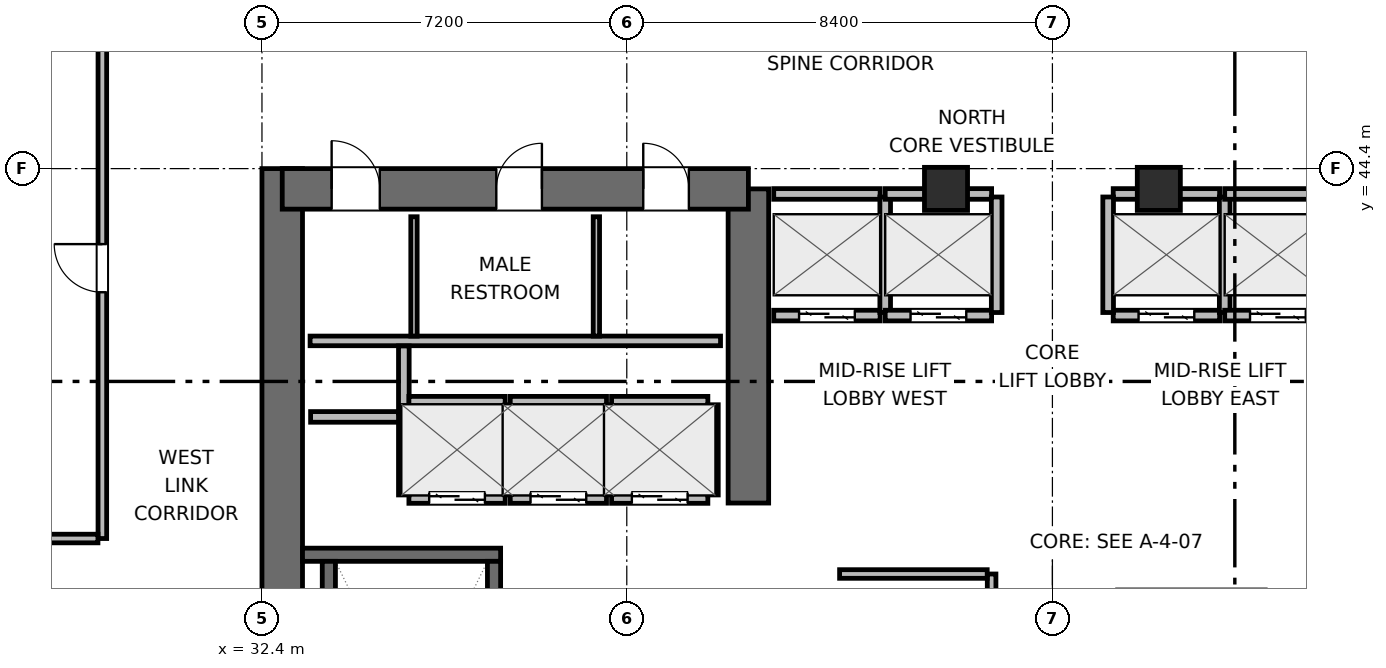
"""IFC4 building model, lengths in metres.
Left out: names, types, materials, properties, quantities, classifications, styles, units other than length and angle.
Written with IfcOpenShell. Run it as: python <this file> out.ifc"""

import sys

from ifc_helpers import new_model, si_unit, direction, frame, frame_2d, origin, origin_2d, place, context, subcontext, project, spatial, rectangle, extrude, element, fill, save


model = new_model("IFC4")
c1 = context("Model", 3, precision=1e-05, world=origin(), true_north=direction((0.0, 1.0)))
c2 = subcontext(c1, "Body", "Model", "MODEL_VIEW")
j1 = project(units=[si_unit("LENGTHUNIT", "METRE"), si_unit("PLANEANGLEUNIT", "RADIAN")], contexts=[c1])
p1 = place(None, origin())
s1 = spatial("IfcSite", under=j1, at=p1, CompositionType="ELEMENT")
p2 = place(p1, origin())
s2 = spatial("IfcBuilding", under=s1, at=p2, CompositionType="ELEMENT")
p3 = place(p2, frame((0.0, 0.0, 120.9)))
s3 = spatial("IfcBuildingStorey", under=s2, at=p3, CompositionType="ELEMENT", Elevation=120.9)
p4 = place(p3, frame((32.8, 27.6, 0.0), z_axis=(0.0, 0.0, 1.0), x_axis=(0.0, 1.0, 0.0)))
e1 = element("IfcWall", 1, at=p4, inside=s3, PredefinedType="SHEAR", context=c2, shape_type="SweptSolid", body=[
    extrude(rectangle(XDim=16.8, YDim=0.8, at=frame_2d((8.4, 0.0))), origin(), (0.0, 0.0, 1.0), 4.5),
])
p5 = place(p3, frame((42.0, 37.8, 0.0), z_axis=(0.0, 0.0, 1.0), x_axis=(0.0, 1.0, 0.0)))
e2 = element("IfcWall", 2, at=p5, inside=s3, PredefinedType="SHEAR", context=c2, shape_type="SweptSolid", body=[
    extrude(rectangle(XDim=6.2, YDim=0.8, at=frame_2d((3.1, 0.0))), origin(), (0.0, 0.0, 1.0), 4.5),
])
p6 = place(p3, frame((32.8, 44.0, 0.0), z_axis=(0.0, 0.0, 1.0), x_axis=(1.0, 0.0, 0.0)))
e3 = element("IfcWall", 3, at=p6, inside=s3, PredefinedType="SHEAR", context=c2, shape_type="SweptSolid", body=[
    extrude(rectangle(XDim=9.2, YDim=0.8, at=frame_2d((4.6, 0.0))), origin(), (0.0, 0.0, 1.0), 4.5),
])
p7 = place(p6, frame((0.975, 0.0, 0.0)))
e4 = element("IfcOpeningElement", 4, at=p7, cuts=e3, PredefinedType="OPENING", context=c2, shape_type="SweptSolid", body=[
    extrude(rectangle(XDim=0.95, YDim=2.04, at=frame_2d((0.475, 1.02))), frame((0.0, 0.41, 0.0), z_axis=(0.0, -1.0, 0.0), x_axis=(1.0, 0.0, 0.0)), (0.0, 0.0, 1.0), 0.82),
])
p8 = place(p6, frame((4.225, 0.0, 0.0)))
e5 = element("IfcOpeningElement", 5, at=p8, cuts=e3, PredefinedType="OPENING", context=c2, shape_type="SweptSolid", body=[
    extrude(rectangle(XDim=0.9, YDim=2.02, at=frame_2d((0.45, 1.01))), frame((0.0, 0.41, 0.0), z_axis=(0.0, -1.0, 0.0), x_axis=(1.0, 0.0, 0.0)), (0.0, 0.0, 1.0), 0.82),
])
p9 = place(p6, frame((7.125, 0.0, 0.0)))
e6 = element("IfcOpeningElement", 6, at=p9, cuts=e3, PredefinedType="OPENING", context=c2, shape_type="SweptSolid", body=[
    extrude(rectangle(XDim=0.9, YDim=2.02, at=frame_2d((0.45, 1.01))), frame((0.0, 0.41, 0.0), z_axis=(0.0, -1.0, 0.0), x_axis=(1.0, 0.0, 0.0)), (0.0, 0.0, 1.0), 0.82),
])
p10 = place(p3, frame((33.2, 36.78, 0.0), z_axis=(0.0, 0.0, 1.0), x_axis=(1.0, 0.0, 0.0)))
e7 = element("IfcWall", 7, at=p10, inside=s3, PredefinedType="SHEAR", context=c2, shape_type="SweptSolid", body=[
    extrude(rectangle(XDim=3.91, YDim=0.26, at=frame_2d((1.955, 0.0))), origin(), (0.0, 0.0, 1.0), 4.5),
])
p11 = place(p3, frame((33.72, 29.05, 0.0), z_axis=(0.0, 0.0, 1.0), x_axis=(0.0, 1.0, 0.0)))
e8 = element("IfcWall", 8, at=p11, inside=s3, PredefinedType="SHEAR", context=c2, shape_type="SweptSolid", body=[
    extrude(rectangle(XDim=7.6, YDim=0.26, at=frame_2d((3.8, 0.0))), origin(), (0.0, 0.0, 1.0), 4.5),
])
p12 = place(p3, frame((36.98, 29.05, 0.0), z_axis=(0.0, 0.0, 1.0), x_axis=(0.0, 1.0, 0.0)))
e9 = element("IfcWall", 9, at=p12, inside=s3, PredefinedType="SHEAR", context=c2, shape_type="SweptSolid", body=[
    extrude(rectangle(XDim=7.6, YDim=0.26, at=frame_2d((3.8, 0.0))), origin(), (0.0, 0.0, 1.0), 4.5),
])
p13 = place(p12, frame((0.3, 0.0, 0.0)))
e10 = element("IfcOpeningElement", 10, at=p13, cuts=e9, PredefinedType="OPENING", context=c2, shape_type="SweptSolid", body=[
    extrude(rectangle(XDim=1.0, YDim=2.04, at=frame_2d((0.5, 1.02))), frame((0.0, 0.14, 0.0), z_axis=(0.0, -1.0, 0.0), x_axis=(1.0, 0.0, 0.0)), (0.0, 0.0, 1.0), 0.28),
])
for number, where, z_axis, x_axis in (
    (11, (45.9, 44.0, 0.0), (0.0, 0.0, 1.0), (1.0, 0.0, 0.0)),
    (12, (50.1, 44.0, 0.0), (0.0, 0.0, 1.0), (1.0, 0.0, 0.0)),
):
    element("IfcColumn", number, at=place(p3, frame(where, z_axis=z_axis, x_axis=x_axis)), inside=s3, PredefinedType="COLUMN", context=c2, shape_type="SweptSolid", body=[
        extrude(rectangle(XDim=0.85, YDim=0.85, at=origin_2d()), origin(), (0.0, 0.0, 1.0), 4.5),
    ])
p14 = place(p3, frame((33.35, 41.0, 0.0), z_axis=(0.0, 0.0, 1.0), x_axis=(1.0, 0.0, 0.0)))
e13 = element("IfcWall", 13, at=p14, inside=s3, PredefinedType="PLUMBINGWALL", context=c2, shape_type="SweptSolid", body=[
    extrude(rectangle(XDim=8.1, YDim=0.19, at=frame_2d((4.05, 0.0))), origin(), (0.0, 0.0, 1.0), 4.24),
])
for number, where, z_axis, x_axis in (
    (14, (35.4, 41.095, 0.0), (0.0, 0.0, 1.0), (0.0, 1.0, 0.0)),
    (15, (39.0, 41.095, 0.0), (0.0, 0.0, 1.0), (0.0, 1.0, 0.0)),
):
    element("IfcWall", number, at=place(p3, frame(where, z_axis=z_axis, x_axis=x_axis)), inside=s3, PredefinedType="PARTITIONING", context=c2, shape_type="SweptSolid", body=[
        extrude(rectangle(XDim=2.355, YDim=0.125, at=frame_2d((1.177, 0.0))), origin(), (0.0, 0.0, 1.0), 4.24),
    ])
p15 = place(p3, frame((33.36, 39.5, 0.0), z_axis=(0.0, 0.0, 1.0), x_axis=(1.0, 0.0, 0.0)))
e16 = element("IfcWall", 16, at=p15, inside=s3, PredefinedType="PARTITIONING", context=c2, shape_type="SweptSolid", body=[
    extrude(rectangle(XDim=1.86, YDim=0.21, at=frame_2d((0.93, 0.0))), origin(), (0.0, 0.0, 1.0), 4.24),
])
p16 = place(p3, frame((35.2, 39.58, 0.0), z_axis=(0.0, 0.0, 1.0), x_axis=(0.0, 1.0, 0.0)))
e17 = element("IfcWall", 17, at=p16, inside=s3, PredefinedType="PARTITIONING", context=c2, shape_type="SweptSolid", body=[
    extrude(rectangle(XDim=1.32, YDim=0.21, at=frame_2d((0.66, 0.0))), origin(), (0.0, 0.0, 1.0), 4.24),
])
p17 = place(p3, frame((42.5, 41.5, 0.0), z_axis=(0.0, 0.0, 1.0), x_axis=(1.0, 0.0, 0.0)))
e18 = element("IfcWall", 18, at=p17, inside=s3, PredefinedType="PARTITIONING", context=c2, shape_type="SweptSolid", body=[
    extrude(rectangle(XDim=2.1, YDim=0.21, at=frame_2d((1.05, 0.0))), origin(), (0.0, 0.0, 1.0), 4.24),
])
p18 = place(p17, frame((0.5, 0.0, 0.0)))
e19 = element("IfcOpeningElement", 19, at=p18, cuts=e18, PredefinedType="OPENING", context=c2, shape_type="SweptSolid", body=[
    extrude(rectangle(XDim=1.1, YDim=2.04, at=frame_2d((0.55, 1.02))), frame((0.0, 0.115, 0.0), z_axis=(0.0, -1.0, 0.0), x_axis=(1.0, 0.0, 0.0)), (0.0, 0.0, 1.0), 0.23),
])
p19 = place(p3, frame((42.5, 43.9, 0.0), z_axis=(0.0, 0.0, 1.0), x_axis=(1.0, 0.0, 0.0)))
e20 = element("IfcWall", 20, at=p19, inside=s3, PredefinedType="PARTITIONING", context=c2, shape_type="SweptSolid", body=[
    extrude(rectangle(XDim=2.1, YDim=0.21, at=frame_2d((1.05, 0.0))), origin(), (0.0, 0.0, 1.0), 3.125),
])
p20 = place(p3, frame((44.7, 41.56, 0.0), z_axis=(0.0, 0.0, 1.0), x_axis=(0.0, 1.0, 0.0)))
e21 = element("IfcWall", 21, at=p20, inside=s3, PredefinedType="PARTITIONING", context=c2, shape_type="SweptSolid", body=[
    extrude(rectangle(XDim=2.28, YDim=0.21, at=frame_2d((1.14, 0.0))), origin(), (0.0, 0.0, 1.0), 4.24),
])
p21 = place(p3, frame((44.7, 41.5, 0.0), z_axis=(0.0, 0.0, 1.0), x_axis=(1.0, 0.0, 0.0)))
e22 = element("IfcWall", 22, at=p21, inside=s3, PredefinedType="PARTITIONING", context=c2, shape_type="SweptSolid", body=[
    extrude(rectangle(XDim=2.1, YDim=0.21, at=frame_2d((1.05, 0.0))), origin(), (0.0, 0.0, 1.0), 4.24),
])
p22 = place(p21, frame((0.5, 0.0, 0.0)))
e23 = element("IfcOpeningElement", 23, at=p22, cuts=e22, PredefinedType="OPENING", context=c2, shape_type="SweptSolid", body=[
    extrude(rectangle(XDim=1.1, YDim=2.04, at=frame_2d((0.55, 1.02))), frame((0.0, 0.115, 0.0), z_axis=(0.0, -1.0, 0.0), x_axis=(1.0, 0.0, 0.0)), (0.0, 0.0, 1.0), 0.23),
])
p23 = place(p3, frame((44.7, 43.9, 0.0), z_axis=(0.0, 0.0, 1.0), x_axis=(1.0, 0.0, 0.0)))
e24 = element("IfcWall", 24, at=p23, inside=s3, PredefinedType="PARTITIONING", context=c2, shape_type="SweptSolid", body=[
    extrude(rectangle(XDim=2.1, YDim=0.21, at=frame_2d((1.05, 0.0))), origin(), (0.0, 0.0, 1.0), 3.125),
])
p24 = place(p3, frame((46.9, 41.56, 0.0), z_axis=(0.0, 0.0, 1.0), x_axis=(0.0, 1.0, 0.0)))
e25 = element("IfcWall", 25, at=p24, inside=s3, PredefinedType="PARTITIONING", context=c2, shape_type="SweptSolid", body=[
    extrude(rectangle(XDim=2.28, YDim=0.21, at=frame_2d((1.14, 0.0))), origin(), (0.0, 0.0, 1.0), 4.24),
])
p25 = place(p3, frame((49.2, 41.5, 0.0), z_axis=(0.0, 0.0, 1.0), x_axis=(1.0, 0.0, 0.0)))
e26 = element("IfcWall", 26, at=p25, inside=s3, PredefinedType="PARTITIONING", context=c2, shape_type="SweptSolid", body=[
    extrude(rectangle(XDim=2.1, YDim=0.21, at=frame_2d((1.05, 0.0))), origin(), (0.0, 0.0, 1.0), 4.24),
])
p26 = place(p25, frame((0.5, 0.0, 0.0)))
e27 = element("IfcOpeningElement", 27, at=p26, cuts=e26, PredefinedType="OPENING", context=c2, shape_type="SweptSolid", body=[
    extrude(rectangle(XDim=1.1, YDim=2.04, at=frame_2d((0.55, 1.02))), frame((0.0, 0.115, 0.0), z_axis=(0.0, -1.0, 0.0), x_axis=(1.0, 0.0, 0.0)), (0.0, 0.0, 1.0), 0.23),
])
p27 = place(p3, frame((49.2, 43.9, 0.0), z_axis=(0.0, 0.0, 1.0), x_axis=(1.0, 0.0, 0.0)))
e28 = element("IfcWall", 28, at=p27, inside=s3, PredefinedType="PARTITIONING", context=c2, shape_type="SweptSolid", body=[
    extrude(rectangle(XDim=2.1, YDim=0.21, at=frame_2d((1.05, 0.0))), origin(), (0.0, 0.0, 1.0), 3.125),
])
for number, where, z_axis, x_axis in (
    (29, (49.1, 41.56, 0.0), (0.0, 0.0, 1.0), (0.0, 1.0, 0.0)),
    (30, (51.4, 41.56, 0.0), (0.0, 0.0, 1.0), (0.0, 1.0, 0.0)),
):
    element("IfcWall", number, at=place(p3, frame(where, z_axis=z_axis, x_axis=x_axis)), inside=s3, PredefinedType="PARTITIONING", context=c2, shape_type="SweptSolid", body=[
        extrude(rectangle(XDim=2.28, YDim=0.21, at=frame_2d((1.14, 0.0))), origin(), (0.0, 0.0, 1.0), 4.24),
    ])
p28 = place(p3, frame((51.4, 41.5, 0.0), z_axis=(0.0, 0.0, 1.0), x_axis=(1.0, 0.0, 0.0)))
e31 = element("IfcWall", 31, at=p28, inside=s3, PredefinedType="PARTITIONING", context=c2, shape_type="SweptSolid", body=[
    extrude(rectangle(XDim=2.1, YDim=0.21, at=frame_2d((1.05, 0.0))), origin(), (0.0, 0.0, 1.0), 4.24),
])
p29 = place(p28, frame((0.5, 0.0, 0.0)))
e32 = element("IfcOpeningElement", 32, at=p29, cuts=e31, PredefinedType="OPENING", context=c2, shape_type="SweptSolid", body=[
    extrude(rectangle(XDim=1.1, YDim=2.04, at=frame_2d((0.55, 1.02))), frame((0.0, 0.115, 0.0), z_axis=(0.0, -1.0, 0.0), x_axis=(1.0, 0.0, 0.0)), (0.0, 0.0, 1.0), 0.23),
])
p30 = place(p3, frame((51.4, 43.9, 0.0), z_axis=(0.0, 0.0, 1.0), x_axis=(1.0, 0.0, 0.0)))
e33 = element("IfcWall", 33, at=p30, inside=s3, PredefinedType="PARTITIONING", context=c2, shape_type="SweptSolid", body=[
    extrude(rectangle(XDim=2.1, YDim=0.21, at=frame_2d((1.05, 0.0))), origin(), (0.0, 0.0, 1.0), 3.125),
])
p31 = place(p3, frame((35.3, 37.9, 0.0), z_axis=(0.0, 0.0, 1.0), x_axis=(1.0, 0.0, 0.0)))
e34 = element("IfcWall", 34, at=p31, inside=s3, PredefinedType="PARTITIONING", context=c2, shape_type="SweptSolid", body=[
    extrude(rectangle(XDim=1.9, YDim=0.21, at=frame_2d((0.95, 0.0))), origin(), (0.0, 0.0, 1.0), 4.24),
])
p32 = place(p31, frame((0.4, 0.0, 0.0)))
e35 = element("IfcOpeningElement", 35, at=p32, cuts=e34, PredefinedType="OPENING", context=c2, shape_type="SweptSolid", body=[
    extrude(rectangle(XDim=1.1, YDim=2.04, at=frame_2d((0.55, 1.02))), frame((0.0, 0.115, 0.0), z_axis=(0.0, -1.0, 0.0), x_axis=(1.0, 0.0, 0.0)), (0.0, 0.0, 1.0), 0.23),
])
p33 = place(p3, frame((35.3, 39.8, 0.0), z_axis=(0.0, 0.0, 1.0), x_axis=(1.0, 0.0, 0.0)))
e36 = element("IfcWall", 36, at=p33, inside=s3, PredefinedType="PARTITIONING", context=c2, shape_type="SweptSolid", body=[
    extrude(rectangle(XDim=1.9, YDim=0.21, at=frame_2d((0.95, 0.0))), origin(), (0.0, 0.0, 1.0), 4.24),
])
p34 = place(p3, frame((35.2, 37.96, 0.0), z_axis=(0.0, 0.0, 1.0), x_axis=(0.0, 1.0, 0.0)))
e37 = element("IfcWall", 37, at=p34, inside=s3, PredefinedType="PARTITIONING", context=c2, shape_type="SweptSolid", body=[
    extrude(rectangle(XDim=1.62, YDim=0.21, at=frame_2d((0.81, 0.0))), origin(), (0.0, 0.0, 1.0), 4.24),
])
p35 = place(p3, frame((37.3, 37.96, 0.0), z_axis=(0.0, 0.0, 1.0), x_axis=(0.0, 1.0, 0.0)))
e38 = element("IfcWall", 38, at=p35, inside=s3, PredefinedType="PARTITIONING", context=c2, shape_type="SweptSolid", body=[
    extrude(rectangle(XDim=1.78, YDim=0.21, at=frame_2d((0.89, 0.0))), origin(), (0.0, 0.0, 1.0), 4.24),
])
p36 = place(p3, frame((37.3, 37.9, 0.0), z_axis=(0.0, 0.0, 1.0), x_axis=(1.0, 0.0, 0.0)))
e39 = element("IfcWall", 39, at=p36, inside=s3, PredefinedType="PARTITIONING", context=c2, shape_type="SweptSolid", body=[
    extrude(rectangle(XDim=1.9, YDim=0.21, at=frame_2d((0.95, 0.0))), origin(), (0.0, 0.0, 1.0), 4.24),
])
p37 = place(p36, frame((0.4, 0.0, 0.0)))
e40 = element("IfcOpeningElement", 40, at=p37, cuts=e39, PredefinedType="OPENING", context=c2, shape_type="SweptSolid", body=[
    extrude(rectangle(XDim=1.1, YDim=2.04, at=frame_2d((0.55, 1.02))), frame((0.0, 0.115, 0.0), z_axis=(0.0, -1.0, 0.0), x_axis=(1.0, 0.0, 0.0)), (0.0, 0.0, 1.0), 0.23),
])
p38 = place(p3, frame((37.3, 39.8, 0.0), z_axis=(0.0, 0.0, 1.0), x_axis=(1.0, 0.0, 0.0)))
e41 = element("IfcWall", 41, at=p38, inside=s3, PredefinedType="PARTITIONING", context=c2, shape_type="SweptSolid", body=[
    extrude(rectangle(XDim=1.9, YDim=0.21, at=frame_2d((0.95, 0.0))), origin(), (0.0, 0.0, 1.0), 4.24),
])
p39 = place(p3, frame((39.3, 37.96, 0.0), z_axis=(0.0, 0.0, 1.0), x_axis=(0.0, 1.0, 0.0)))
e42 = element("IfcWall", 42, at=p39, inside=s3, PredefinedType="PARTITIONING", context=c2, shape_type="SweptSolid", body=[
    extrude(rectangle(XDim=1.78, YDim=0.21, at=frame_2d((0.89, 0.0))), origin(), (0.0, 0.0, 1.0), 4.24),
])
p40 = place(p3, frame((39.3, 37.9, 0.0), z_axis=(0.0, 0.0, 1.0), x_axis=(1.0, 0.0, 0.0)))
e43 = element("IfcWall", 43, at=p40, inside=s3, PredefinedType="PARTITIONING", context=c2, shape_type="SweptSolid", body=[
    extrude(rectangle(XDim=1.9, YDim=0.21, at=frame_2d((0.95, 0.0))), origin(), (0.0, 0.0, 1.0), 4.24),
])
p41 = place(p40, frame((0.4, 0.0, 0.0)))
e44 = element("IfcOpeningElement", 44, at=p41, cuts=e43, PredefinedType="OPENING", context=c2, shape_type="SweptSolid", body=[
    extrude(rectangle(XDim=1.1, YDim=2.04, at=frame_2d((0.55, 1.02))), frame((0.0, 0.115, 0.0), z_axis=(0.0, -1.0, 0.0), x_axis=(1.0, 0.0, 0.0)), (0.0, 0.0, 1.0), 0.23),
])
p42 = place(p3, frame((39.3, 39.8, 0.0), z_axis=(0.0, 0.0, 1.0), x_axis=(1.0, 0.0, 0.0)))
e45 = element("IfcWall", 45, at=p42, inside=s3, PredefinedType="PARTITIONING", context=c2, shape_type="SweptSolid", body=[
    extrude(rectangle(XDim=1.9, YDim=0.21, at=frame_2d((0.95, 0.0))), origin(), (0.0, 0.0, 1.0), 4.24),
])
p43 = place(p3, frame((41.3, 37.96, 0.0), z_axis=(0.0, 0.0, 1.0), x_axis=(0.0, 1.0, 0.0)))
e46 = element("IfcWall", 46, at=p43, inside=s3, PredefinedType="PARTITIONING", context=c2, shape_type="SweptSolid", body=[
    extrude(rectangle(XDim=1.78, YDim=0.21, at=frame_2d((0.89, 0.0))), origin(), (0.0, 0.0, 1.0), 4.24),
])
p44 = place(p3, frame((46.8, 32.6, 0.0), z_axis=(0.0, 0.0, 1.0), x_axis=(0.0, 1.0, 0.0)))
e47 = element("IfcWall", 47, at=p44, inside=s3, PredefinedType="PARTITIONING", context=c2, shape_type="SweptSolid", body=[
    extrude(rectangle(XDim=3.8, YDim=0.17, at=frame_2d((1.9, 0.0))), origin(), (0.0, 0.0, 1.0), 4.24),
])
p45 = place(p44, frame((0.5, 0.0, 0.0)))
e48 = element("IfcOpeningElement", 48, at=p45, cuts=e47, PredefinedType="OPENING", context=c2, shape_type="SweptSolid", body=[
    extrude(rectangle(XDim=0.9, YDim=2.02, at=frame_2d((0.45, 1.01))), frame((0.0, 0.095, 0.0), z_axis=(0.0, -1.0, 0.0), x_axis=(1.0, 0.0, 0.0)), (0.0, 0.0, 1.0), 0.19),
])
p46 = place(p44, frame((2.4, 0.0, 0.0)))
e49 = element("IfcOpeningElement", 49, at=p46, cuts=e47, PredefinedType="OPENING", context=c2, shape_type="SweptSolid", body=[
    extrude(rectangle(XDim=0.9, YDim=2.02, at=frame_2d((0.45, 1.01))), frame((0.0, 0.095, 0.0), z_axis=(0.0, -1.0, 0.0), x_axis=(1.0, 0.0, 0.0)), (0.0, 0.0, 1.0), 0.19),
])
p47 = place(p3, frame((43.8, 36.4, 0.0), z_axis=(0.0, 0.0, 1.0), x_axis=(1.0, 0.0, 0.0)))
e50 = element("IfcWall", 50, at=p47, inside=s3, PredefinedType="PARTITIONING", context=c2, shape_type="SweptSolid", body=[
    extrude(rectangle(XDim=2.913, YDim=0.17, at=frame_2d((1.457, 0.0))), origin(), (0.0, 0.0, 1.0), 4.24),
])
p48 = place(p3, frame((29.25, 37.1, 0.0), z_axis=(0.0, 0.0, 1.0), x_axis=(0.0, 1.0, 0.0)))
e51 = element("IfcWall", 51, at=p48, inside=s3, PredefinedType="PARTITIONING", context=c2, shape_type="SweptSolid", body=[
    extrude(rectangle(XDim=10.583, YDim=0.17, at=frame_2d((5.292, 0.0))), origin(), (0.0, 0.0, 1.0), 4.24),
])
p49 = place(p48, frame((4.86, 0.0, 0.0)))
e52 = element("IfcOpeningElement", 52, at=p49, cuts=e51, PredefinedType="OPENING", context=c2, shape_type="SweptSolid", body=[
    extrude(rectangle(XDim=0.95, YDim=2.04, at=frame_2d((0.475, 1.02))), frame((0.0, 0.095, 0.0), z_axis=(0.0, -1.0, 0.0), x_axis=(1.0, 0.0, 0.0)), (0.0, 0.0, 1.0), 0.19),
])
p50 = place(p3, frame((18.265, 37.1, 0.0), z_axis=(0.0, 0.0, 1.0), x_axis=(1.0, 0.0, 0.0)))
e53 = element("IfcWall", 53, at=p50, inside=s3, PredefinedType="PARTITIONING", context=c2, shape_type="SweptSolid", body=[
    extrude(rectangle(XDim=10.898, YDim=0.17, at=frame_2d((5.449, 0.0))), origin(), (0.0, 0.0, 1.0), 4.24),
])
p51 = place(p18, origin())
e54 = element("IfcDoor", 54, at=p51, inside=s3, OperationType="DOUBLE_DOOR_SLIDING", PredefinedType="DOOR", context=c2, shape_type="SweptSolid", body=[
    extrude(rectangle(XDim=1.1, YDim=2.04, at=frame_2d((0.55, 1.02))), frame((0.0, 0.025, 0.0), z_axis=(0.0, -1.0, 0.0), x_axis=(1.0, 0.0, 0.0)), (0.0, 0.0, 1.0), 0.05),
])
fill(e19, e54)
p52 = place(p22, origin())
e55 = element("IfcDoor", 55, at=p52, inside=s3, OperationType="DOUBLE_DOOR_SLIDING", PredefinedType="DOOR", context=c2, shape_type="SweptSolid", body=[
    extrude(rectangle(XDim=1.1, YDim=2.04, at=frame_2d((0.55, 1.02))), frame((0.0, 0.025, 0.0), z_axis=(0.0, -1.0, 0.0), x_axis=(1.0, 0.0, 0.0)), (0.0, 0.0, 1.0), 0.05),
])
fill(e23, e55)
p53 = place(p26, origin())
e56 = element("IfcDoor", 56, at=p53, inside=s3, OperationType="DOUBLE_DOOR_SLIDING", PredefinedType="DOOR", context=c2, shape_type="SweptSolid", body=[
    extrude(rectangle(XDim=1.1, YDim=2.04, at=frame_2d((0.55, 1.02))), frame((0.0, 0.025, 0.0), z_axis=(0.0, -1.0, 0.0), x_axis=(1.0, 0.0, 0.0)), (0.0, 0.0, 1.0), 0.05),
])
fill(e27, e56)
p54 = place(p29, origin())
e57 = element("IfcDoor", 57, at=p54, inside=s3, OperationType="DOUBLE_DOOR_SLIDING", PredefinedType="DOOR", context=c2, shape_type="SweptSolid", body=[
    extrude(rectangle(XDim=1.1, YDim=2.04, at=frame_2d((0.55, 1.02))), frame((0.0, 0.025, 0.0), z_axis=(0.0, -1.0, 0.0), x_axis=(1.0, 0.0, 0.0)), (0.0, 0.0, 1.0), 0.05),
])
fill(e32, e57)
p55 = place(p32, origin())
e58 = element("IfcDoor", 58, at=p55, inside=s3, OperationType="DOUBLE_DOOR_SLIDING", PredefinedType="DOOR", context=c2, shape_type="SweptSolid", body=[
    extrude(rectangle(XDim=1.1, YDim=2.04, at=frame_2d((0.55, 1.02))), frame((0.0, 0.025, 0.0), z_axis=(0.0, -1.0, 0.0), x_axis=(1.0, 0.0, 0.0)), (0.0, 0.0, 1.0), 0.05),
])
fill(e35, e58)
p56 = place(p37, origin())
e59 = element("IfcDoor", 59, at=p56, inside=s3, OperationType="DOUBLE_DOOR_SLIDING", PredefinedType="DOOR", context=c2, shape_type="SweptSolid", body=[
    extrude(rectangle(XDim=1.1, YDim=2.04, at=frame_2d((0.55, 1.02))), frame((0.0, 0.025, 0.0), z_axis=(0.0, -1.0, 0.0), x_axis=(1.0, 0.0, 0.0)), (0.0, 0.0, 1.0), 0.05),
])
fill(e40, e59)
p57 = place(p41, origin())
e60 = element("IfcDoor", 60, at=p57, inside=s3, OperationType="DOUBLE_DOOR_SLIDING", PredefinedType="DOOR", context=c2, shape_type="SweptSolid", body=[
    extrude(rectangle(XDim=1.1, YDim=2.04, at=frame_2d((0.55, 1.02))), frame((0.0, 0.025, 0.0), z_axis=(0.0, -1.0, 0.0), x_axis=(1.0, 0.0, 0.0)), (0.0, 0.0, 1.0), 0.05),
])
fill(e44, e60)
p58 = place(p7, origin())
e61 = element("IfcDoor", 61, at=p58, inside=s3, OperationType="SINGLE_SWING_LEFT", PredefinedType="DOOR", context=c2, shape_type="SweptSolid", body=[
    extrude(rectangle(XDim=0.95, YDim=2.04, at=frame_2d((0.475, 1.02))), frame((0.0, 0.025, 0.0), z_axis=(0.0, -1.0, 0.0), x_axis=(1.0, 0.0, 0.0)), (0.0, 0.0, 1.0), 0.05),
])
fill(e4, e61)
p59 = place(p8, origin())
e62 = element("IfcDoor", 62, at=p59, inside=s3, OperationType="SINGLE_SWING_RIGHT", PredefinedType="DOOR", context=c2, shape_type="SweptSolid", body=[
    extrude(rectangle(XDim=0.9, YDim=2.02, at=frame_2d((0.45, 1.01))), frame((0.0, 0.025, 0.0), z_axis=(0.0, -1.0, 0.0), x_axis=(1.0, 0.0, 0.0)), (0.0, 0.0, 1.0), 0.05),
])
fill(e5, e62)
p60 = place(p9, origin())
e63 = element("IfcDoor", 63, at=p60, inside=s3, OperationType="SINGLE_SWING_LEFT", PredefinedType="DOOR", context=c2, shape_type="SweptSolid", body=[
    extrude(rectangle(XDim=0.9, YDim=2.02, at=frame_2d((0.45, 1.01))), frame((0.0, 0.025, 0.0), z_axis=(0.0, -1.0, 0.0), x_axis=(1.0, 0.0, 0.0)), (0.0, 0.0, 1.0), 0.05),
])
fill(e6, e63)
p61 = place(p49, origin())
e64 = element("IfcDoor", 64, at=p61, inside=s3, OperationType="SINGLE_SWING_RIGHT", PredefinedType="DOOR", context=c2, shape_type="SweptSolid", body=[
    extrude(rectangle(XDim=0.95, YDim=2.04, at=frame_2d((0.475, 1.02))), frame((0.0, 0.025, 0.0), z_axis=(0.0, -1.0, 0.0), x_axis=(1.0, 0.0, 0.0)), (0.0, 0.0, 1.0), 0.05),
])
fill(e52, e64)
save(model, sys.argv[1])
